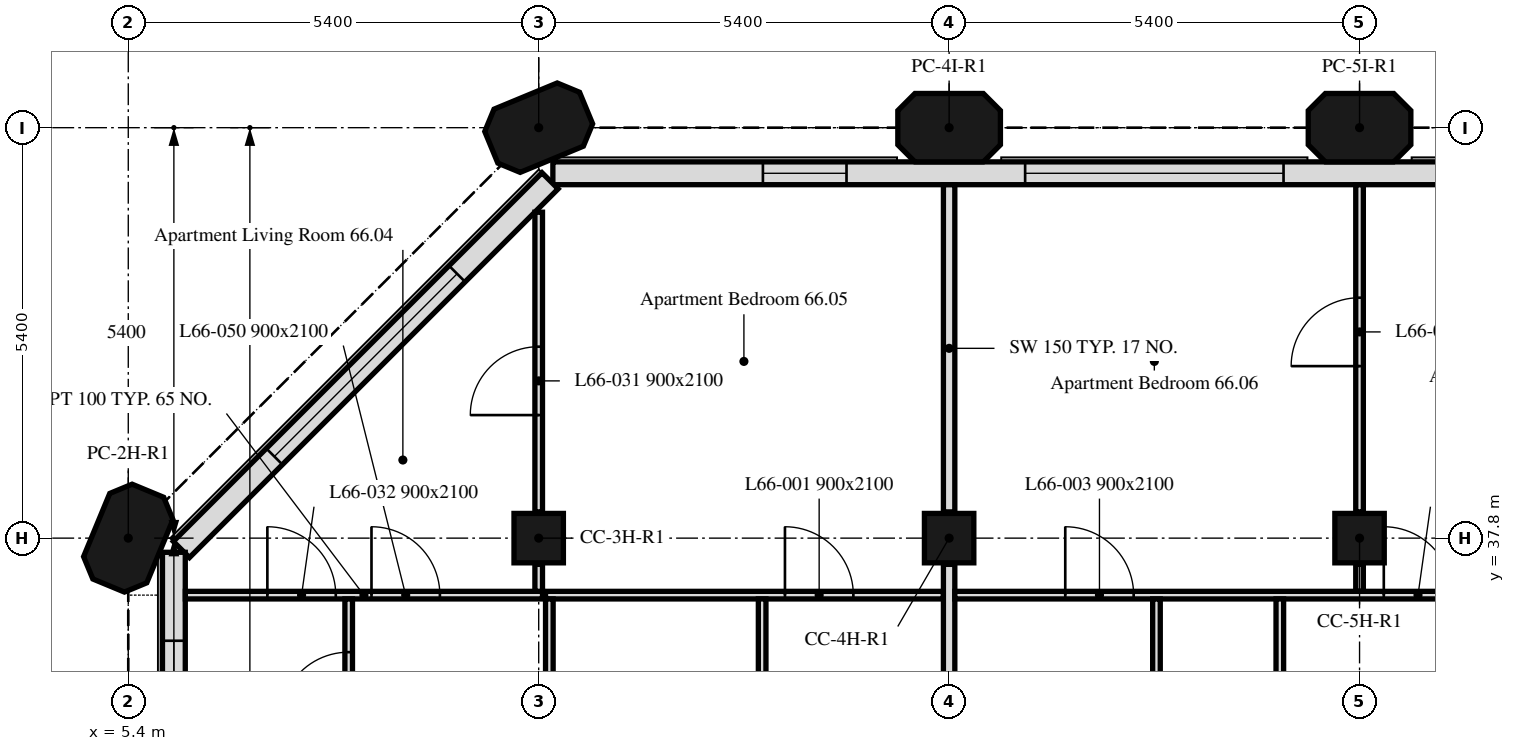
"""IFC4 building model, lengths in metres.
Left out: names, types, materials, properties, quantities, classifications, styles, units other than length and angle.
Written with IfcOpenShell. Run it as: python <this file> out.ifc"""

import sys

from ifc_helpers import new_model, si_unit, direction, frame, frame_2d, origin, origin_2d, place, context, subcontext, project, spatial, polyline, rectangle, outline, extrude, element, fill, save


model = new_model("IFC4")
c1 = context("Model", 3, precision=1e-05, world=origin(), true_north=direction((0.0, 1.0)))
c2 = subcontext(c1, "Body", "Model", "MODEL_VIEW")
j1 = project(units=[si_unit("LENGTHUNIT", "METRE"), si_unit("PLANEANGLEUNIT", "RADIAN")], contexts=[c1])
p1 = place(None, origin())
s1 = spatial("IfcSite", under=j1, at=p1, CompositionType="ELEMENT")
p2 = place(p1, origin())
s2 = spatial("IfcBuilding", under=s1, at=p2, CompositionType="ELEMENT")
p3 = place(p2, frame((0.0, 0.0, 271.9)))
s3 = spatial("IfcBuildingStorey", under=s2, at=p3, CompositionType="ELEMENT", Elevation=271.9)
p4 = place(p3, frame((5.4, 37.8, 0.0), z_axis=(0.0, 0.0, 1.0), x_axis=(0.382683432365, 0.923879532511, 0.0)))
e1 = element("IfcColumn", 1, at=p4, inside=s3, PredefinedType="COLUMN", context=c2, shape_type="SweptSolid", body=[
    extrude(outline(polyline([(-0.45, -0.45), (0.45, -0.45), (0.675, -0.225), (0.675, 0.225), (0.45, 0.45), (-0.45, 0.45), (-0.675, 0.225), (-0.675, -0.225), (-0.45, -0.45)])), origin(), (0.0, 0.0, 1.0), 3.0),
])
for number, where, z_axis, x_axis in (
    (2, (10.8, 37.8, 0.0), (0.0, 0.0, 1.0), (1.0, 0.0, 0.0)),
    (3, (16.2, 37.8, 0.0), (0.0, 0.0, 1.0), (1.0, 0.0, 0.0)),
    (4, (21.6, 37.8, 0.0), (0.0, 0.0, 1.0), (1.0, 0.0, 0.0)),
):
    element("IfcColumn", number, at=place(p3, frame(where, z_axis=z_axis, x_axis=x_axis)), inside=s3, PredefinedType="COLUMN", context=c2, shape_type="SweptSolid", body=[
        extrude(rectangle(XDim=0.65, YDim=0.65, at=origin_2d()), origin(), (0.0, 0.0, 1.0), 3.0),
    ])
for number, where, z_axis, x_axis in (
    (5, (10.8, 43.2, 0.0), (0.0, 0.0, 1.0), (0.924, 0.383, 0.0)),
    (6, (16.2, 43.2, 0.0), (0.0, 0.0, 1.0), (1.0, 0.0, 0.0)),
    (7, (21.6, 43.2, 0.0), (0.0, 0.0, 1.0), (1.0, 0.0, 0.0)),
):
    element("IfcColumn", number, at=place(p3, frame(where, z_axis=z_axis, x_axis=x_axis)), inside=s3, PredefinedType="COLUMN", context=c2, shape_type="SweptSolid", body=[
        extrude(outline(polyline([(-0.45, -0.45), (0.45, -0.45), (0.675, -0.225), (0.675, 0.225), (0.45, 0.45), (-0.45, 0.45), (-0.675, 0.225), (-0.675, -0.225), (-0.45, -0.45)])), origin(), (0.0, 0.0, 1.0), 3.0),
    ])
p5 = place(p3, frame((43.014, 42.6, 0.0), z_axis=(0.0, 0.0, 1.0), x_axis=(-1.0, 0.0, 0.0)))
e8 = element("IfcWall", 8, at=p5, inside=s3, PredefinedType="SOLIDWALL", context=c2, shape_type="SweptSolid", body=[
    extrude(rectangle(XDim=32.027, YDim=0.3, at=frame_2d((16.014, 0.0))), origin(), (0.0, 0.0, 1.0), 3.0),
])
p6 = place(p5, frame((0.814, 0.0, 0.9)))
e9 = element("IfcOpeningElement", 9, at=p6, cuts=e8, PredefinedType="OPENING", context=c2, shape_type="SweptSolid", body=[
    extrude(rectangle(XDim=3.4, YDim=1.7, at=frame_2d((1.7, 0.85))), frame((0.0, 0.16, 0.0), z_axis=(0.0, -1.0, 0.0), x_axis=(1.0, 0.0, 0.0)), (0.0, 0.0, 1.0), 0.32),
])
p7 = place(p5, frame((6.564, 0.0, 0.9)))
e10 = element("IfcOpeningElement", 10, at=p7, cuts=e8, PredefinedType="OPENING", context=c2, shape_type="SweptSolid", body=[
    extrude(rectangle(XDim=1.1, YDim=1.7, at=frame_2d((0.55, 0.85))), frame((0.0, 0.16, 0.0), z_axis=(0.0, -1.0, 0.0), x_axis=(1.0, 0.0, 0.0)), (0.0, 0.0, 1.0), 0.32),
])
p8 = place(p5, frame((11.614, 0.0, 0.9)))
e11 = element("IfcOpeningElement", 11, at=p8, cuts=e8, PredefinedType="OPENING", context=c2, shape_type="SweptSolid", body=[
    extrude(rectangle(XDim=3.4, YDim=1.7, at=frame_2d((1.7, 0.85))), frame((0.0, 0.16, 0.0), z_axis=(0.0, -1.0, 0.0), x_axis=(1.0, 0.0, 0.0)), (0.0, 0.0, 1.0), 0.32),
])
p9 = place(p5, frame((17.364, 0.0, 0.9)))
e12 = element("IfcOpeningElement", 12, at=p9, cuts=e8, PredefinedType="OPENING", context=c2, shape_type="SweptSolid", body=[
    extrude(rectangle(XDim=1.1, YDim=1.7, at=frame_2d((0.55, 0.85))), frame((0.0, 0.16, 0.0), z_axis=(0.0, -1.0, 0.0), x_axis=(1.0, 0.0, 0.0)), (0.0, 0.0, 1.0), 0.32),
])
p10 = place(p5, frame((22.414, 0.0, 0.9)))
e13 = element("IfcOpeningElement", 13, at=p10, cuts=e8, PredefinedType="OPENING", context=c2, shape_type="SweptSolid", body=[
    extrude(rectangle(XDim=3.4, YDim=1.7, at=frame_2d((1.7, 0.85))), frame((0.0, 0.16, 0.0), z_axis=(0.0, -1.0, 0.0), x_axis=(1.0, 0.0, 0.0)), (0.0, 0.0, 1.0), 0.32),
])
p11 = place(p5, frame((28.164, 0.0, 0.9)))
e14 = element("IfcOpeningElement", 14, at=p11, cuts=e8, PredefinedType="OPENING", context=c2, shape_type="SweptSolid", body=[
    extrude(rectangle(XDim=1.1, YDim=1.7, at=frame_2d((0.55, 0.85))), frame((0.0, 0.16, 0.0), z_axis=(0.0, -1.0, 0.0), x_axis=(1.0, 0.0, 0.0)), (0.0, 0.0, 1.0), 0.32),
])
p12 = place(p3, frame((10.949, 42.501, 0.0), z_axis=(0.0, 0.0, 1.0), x_axis=(-0.707106781187, -0.707106781187, 0.0)))
e15 = element("IfcWall", 15, at=p12, inside=s3, PredefinedType="SOLIDWALL", context=c2, shape_type="SweptSolid", body=[
    extrude(rectangle(XDim=6.86, YDim=0.3, at=frame_2d((3.43, 0.0))), origin(), (0.0, 0.0, 1.0), 3.0),
])
p13 = place(p12, frame((1.73, 0.0, 0.9)))
e16 = element("IfcOpeningElement", 16, at=p13, cuts=e15, PredefinedType="OPENING", context=c2, shape_type="SweptSolid", body=[
    extrude(rectangle(XDim=3.4, YDim=1.7, at=frame_2d((1.7, 0.85))), frame((0.0, 0.16, 0.0), z_axis=(0.0, -1.0, 0.0), x_axis=(1.0, 0.0, 0.0)), (0.0, 0.0, 1.0), 0.32),
])
p14 = place(p3, frame((6.0, 37.614, 0.0), z_axis=(0.0, 0.0, 1.0), x_axis=(0.0, -1.0, 0.0)))
e17 = element("IfcWall", 17, at=p14, inside=s3, PredefinedType="SOLIDWALL", context=c2, shape_type="SweptSolid", body=[
    extrude(rectangle(XDim=5.214, YDim=0.3, at=frame_2d((2.607, 0.0))), origin(), (0.0, 0.0, 1.0), 3.0),
])
p15 = place(p14, frame((1.164, 0.0, 0.9)))
e18 = element("IfcOpeningElement", 18, at=p15, cuts=e17, PredefinedType="OPENING", context=c2, shape_type="SweptSolid", body=[
    extrude(rectangle(XDim=1.1, YDim=1.7, at=frame_2d((0.55, 0.85))), frame((0.0, 0.16, 0.0), z_axis=(0.0, -1.0, 0.0), x_axis=(1.0, 0.0, 0.0)), (0.0, 0.0, 1.0), 0.32),
])
p16 = place(p14, frame((3.139, 0.0, 0.9)))
e19 = element("IfcOpeningElement", 19, at=p16, cuts=e17, PredefinedType="OPENING", context=c2, shape_type="SweptSolid", body=[
    extrude(rectangle(XDim=0.65, YDim=1.7, at=frame_2d((0.325, 0.85))), frame((0.0, 0.16, 0.0), z_axis=(0.0, -1.0, 0.0), x_axis=(1.0, 0.0, 0.0)), (0.0, 0.0, 1.0), 0.32),
])
p17 = place(p3, frame((6.151, 37.05, 0.0), z_axis=(0.0, 0.0, 1.0), x_axis=(1.0, 0.0, 0.0)))
e20 = element("IfcWall", 20, at=p17, inside=s3, PredefinedType="PARTITIONING", context=c2, shape_type="SweptSolid", body=[
    extrude(rectangle(XDim=4.699, YDim=0.1, at=frame_2d((2.35, 0.0))), origin(), (0.0, 0.0, 1.0), 3.0),
])
p18 = place(p17, frame((1.079, 0.0, 0.0)))
e21 = element("IfcOpeningElement", 21, at=p18, cuts=e20, PredefinedType="OPENING", context=c2, shape_type="SweptSolid", body=[
    extrude(rectangle(XDim=0.9, YDim=2.1, at=frame_2d((0.45, 1.05))), frame((0.0, 0.05, 0.0), z_axis=(0.0, -1.0, 0.0), x_axis=(1.0, 0.0, 0.0)), (0.0, 0.0, 1.0), 0.1),
])
p19 = place(p17, frame((2.449, 0.0, 0.0)))
e22 = element("IfcOpeningElement", 22, at=p19, cuts=e20, PredefinedType="OPENING", context=c2, shape_type="SweptSolid", body=[
    extrude(rectangle(XDim=0.9, YDim=2.1, at=frame_2d((0.45, 1.05))), frame((0.0, 0.05, 0.0), z_axis=(0.0, -1.0, 0.0), x_axis=(1.0, 0.0, 0.0)), (0.0, 0.0, 1.0), 0.1),
])
p20 = place(p3, frame((10.8, 37.1, 0.0), z_axis=(0.0, 0.0, 1.0), x_axis=(0.0, 1.0, 0.0)))
e23 = element("IfcWall", 23, at=p20, inside=s3, PredefinedType="PARTITIONING", context=c2, shape_type="SweptSolid", body=[
    extrude(rectangle(XDim=0.355, YDim=0.1, at=frame_2d((0.177, 0.0))), origin(), (0.0, 0.0, 1.0), 3.0),
])
p21 = place(p3, frame((10.8, 38.145, 0.0), z_axis=(0.0, 0.0, 1.0), x_axis=(0.0, 1.0, 0.0)))
e24 = element("IfcWall", 24, at=p21, inside=s3, PredefinedType="PARTITIONING", context=c2, shape_type="SweptSolid", body=[
    extrude(rectangle(XDim=3.943, YDim=0.1, at=frame_2d((1.971, 0.0))), origin(), (0.0, 0.0, 1.0), 3.0),
])
p22 = place(p21, frame((1.274, 0.0, 0.0)))
e25 = element("IfcOpeningElement", 25, at=p22, cuts=e24, PredefinedType="OPENING", context=c2, shape_type="SweptSolid", body=[
    extrude(rectangle(XDim=0.9, YDim=2.1, at=frame_2d((0.45, 1.05))), frame((0.0, 0.05, 0.0), z_axis=(0.0, -1.0, 0.0), x_axis=(1.0, 0.0, 0.0)), (0.0, 0.0, 1.0), 0.1),
])
p23 = place(p3, frame((10.89, 37.05, 0.0), z_axis=(0.0, 0.0, 1.0), x_axis=(1.0, 0.0, 0.0)))
e26 = element("IfcWall", 26, at=p23, inside=s3, PredefinedType="PARTITIONING", context=c2, shape_type="SweptSolid", body=[
    extrude(rectangle(XDim=5.235, YDim=0.1, at=frame_2d((2.618, 0.0))), origin(), (0.0, 0.0, 1.0), 3.0),
])
p24 = place(p23, frame((3.15, 0.0, 0.0)))
e27 = element("IfcOpeningElement", 27, at=p24, cuts=e26, PredefinedType="OPENING", context=c2, shape_type="SweptSolid", body=[
    extrude(rectangle(XDim=0.9, YDim=2.1, at=frame_2d((0.45, 1.05))), frame((0.0, 0.05, 0.0), z_axis=(0.0, -1.0, 0.0), x_axis=(1.0, 0.0, 0.0)), (0.0, 0.0, 1.0), 0.1),
])
p25 = place(p3, frame((16.2, 38.145, 0.0), z_axis=(0.0, 0.0, 1.0), x_axis=(0.0, 1.0, 0.0)))
e28 = element("IfcWall", 28, at=p25, inside=s3, PredefinedType="PARTITIONING", context=c2, shape_type="SweptSolid", body=[
    extrude(rectangle(XDim=4.304, YDim=0.15, at=frame_2d((2.152, 0.0))), origin(), (0.0, 0.0, 1.0), 3.0),
])
p26 = place(p3, frame((8.3, 34.725, 0.0), z_axis=(0.0, 0.0, 1.0), x_axis=(0.0, 1.0, 0.0)))
e29 = element("IfcWall", 29, at=p26, inside=s3, PredefinedType="PARTITIONING", context=c2, shape_type="SweptSolid", body=[
    extrude(rectangle(XDim=2.275, YDim=0.1, at=frame_2d((1.137, 0.0))), origin(), (0.0, 0.0, 1.0), 3.0),
])
p27 = place(p26, frame((0.675, 0.0, 0.0)))
e30 = element("IfcOpeningElement", 30, at=p27, cuts=e29, PredefinedType="OPENING", context=c2, shape_type="SweptSolid", body=[
    extrude(rectangle(XDim=0.9, YDim=2.1, at=frame_2d((0.45, 1.05))), frame((0.0, 0.05, 0.0), z_axis=(0.0, -1.0, 0.0), x_axis=(1.0, 0.0, 0.0)), (0.0, 0.0, 1.0), 0.1),
])
p28 = place(p3, frame((10.94, 34.725, 0.0), z_axis=(0.0, 0.0, 1.0), x_axis=(0.0, 1.0, 0.0)))
e31 = element("IfcWall", 31, at=p28, inside=s3, PredefinedType="PARTITIONING", context=c2, shape_type="SweptSolid", body=[
    extrude(rectangle(XDim=2.275, YDim=0.1, at=frame_2d((1.137, 0.0))), origin(), (0.0, 0.0, 1.0), 3.0),
])
p29 = place(p28, frame((0.25, 0.0, 0.0)))
e32 = element("IfcOpeningElement", 32, at=p29, cuts=e31, PredefinedType="OPENING", context=c2, shape_type="SweptSolid", body=[
    extrude(rectangle(XDim=0.9, YDim=2.1, at=frame_2d((0.45, 1.05))), frame((0.0, 0.05, 0.0), z_axis=(0.0, -1.0, 0.0), x_axis=(1.0, 0.0, 0.0)), (0.0, 0.0, 1.0), 0.1),
])
p30 = place(p3, frame((13.74, 34.725, 0.0), z_axis=(0.0, 0.0, 1.0), x_axis=(0.0, 1.0, 0.0)))
e33 = element("IfcWall", 33, at=p30, inside=s3, PredefinedType="PARTITIONING", context=c2, shape_type="SweptSolid", body=[
    extrude(rectangle(XDim=2.275, YDim=0.1, at=frame_2d((1.137, 0.0))), origin(), (0.0, 0.0, 1.0), 3.0),
])
p31 = place(p3, frame((16.2, 34.725, 0.0), z_axis=(0.0, 0.0, 1.0), x_axis=(0.0, 1.0, 0.0)))
e34 = element("IfcWall", 34, at=p31, inside=s3, PredefinedType="PARTITIONING", context=c2, shape_type="SweptSolid", body=[
    extrude(rectangle(XDim=2.73, YDim=0.15, at=frame_2d((1.365, 0.0))), origin(), (0.0, 0.0, 1.0), 3.0),
])
p32 = place(p3, frame((21.6, 37.1, 0.0), z_axis=(0.0, 0.0, 1.0), x_axis=(0.0, 1.0, 0.0)))
e35 = element("IfcWall", 35, at=p32, inside=s3, PredefinedType="PARTITIONING", context=c2, shape_type="SweptSolid", body=[
    extrude(rectangle(XDim=0.355, YDim=0.1, at=frame_2d((0.177, 0.0))), origin(), (0.0, 0.0, 1.0), 3.0),
])
p33 = place(p3, frame((21.6, 38.145, 0.0), z_axis=(0.0, 0.0, 1.0), x_axis=(0.0, 1.0, 0.0)))
e36 = element("IfcWall", 36, at=p33, inside=s3, PredefinedType="PARTITIONING", context=c2, shape_type="SweptSolid", body=[
    extrude(rectangle(XDim=4.304, YDim=0.1, at=frame_2d((2.152, 0.0))), origin(), (0.0, 0.0, 1.0), 3.0),
])
p34 = place(p33, frame((1.918, 0.0, 0.0)))
e37 = element("IfcOpeningElement", 37, at=p34, cuts=e36, PredefinedType="OPENING", context=c2, shape_type="SweptSolid", body=[
    extrude(rectangle(XDim=0.9, YDim=2.1, at=frame_2d((0.45, 1.05))), frame((0.0, 0.05, 0.0), z_axis=(0.0, -1.0, 0.0), x_axis=(1.0, 0.0, 0.0)), (0.0, 0.0, 1.0), 0.1),
])
p35 = place(p3, frame((16.275, 37.05, 0.0), z_axis=(0.0, 0.0, 1.0), x_axis=(1.0, 0.0, 0.0)))
e38 = element("IfcWall", 38, at=p35, inside=s3, PredefinedType="PARTITIONING", context=c2, shape_type="SweptSolid", body=[
    extrude(rectangle(XDim=16.05, YDim=0.1, at=frame_2d((8.025, 0.0))), origin(), (0.0, 0.0, 1.0), 3.0),
])
p36 = place(p35, frame((1.453, 0.0, 0.0)))
e39 = element("IfcOpeningElement", 39, at=p36, cuts=e38, PredefinedType="OPENING", context=c2, shape_type="SweptSolid", body=[
    extrude(rectangle(XDim=0.9, YDim=2.1, at=frame_2d((0.45, 1.05))), frame((0.0, 0.05, 0.0), z_axis=(0.0, -1.0, 0.0), x_axis=(1.0, 0.0, 0.0)), (0.0, 0.0, 1.0), 0.1),
])
p37 = place(p35, frame((12.125, 0.0, 0.0)))
e40 = element("IfcOpeningElement", 40, at=p37, cuts=e38, PredefinedType="OPENING", context=c2, shape_type="SweptSolid", body=[
    extrude(rectangle(XDim=0.9, YDim=2.1, at=frame_2d((0.45, 1.05))), frame((0.0, 0.05, 0.0), z_axis=(0.0, -1.0, 0.0), x_axis=(1.0, 0.0, 0.0)), (0.0, 0.0, 1.0), 0.1),
])
p38 = place(p35, frame((13.625, 0.0, 0.0)))
e41 = element("IfcOpeningElement", 41, at=p38, cuts=e38, PredefinedType="OPENING", context=c2, shape_type="SweptSolid", body=[
    extrude(rectangle(XDim=0.9, YDim=2.1, at=frame_2d((0.45, 1.05))), frame((0.0, 0.05, 0.0), z_axis=(0.0, -1.0, 0.0), x_axis=(1.0, 0.0, 0.0)), (0.0, 0.0, 1.0), 0.1),
])
p39 = place(p35, frame((5.644, 0.0, 0.0)))
e42 = element("IfcOpeningElement", 42, at=p39, cuts=e38, PredefinedType="OPENING", context=c2, shape_type="SweptSolid", body=[
    extrude(rectangle(XDim=0.9, YDim=2.1, at=frame_2d((0.45, 1.05))), frame((0.0, 0.05, 0.0), z_axis=(0.0, -1.0, 0.0), x_axis=(1.0, 0.0, 0.0)), (0.0, 0.0, 1.0), 0.1),
])
p40 = place(p3, frame((18.928, 34.725, 0.0), z_axis=(0.0, 0.0, 1.0), x_axis=(0.0, 1.0, 0.0)))
e43 = element("IfcWall", 43, at=p40, inside=s3, PredefinedType="PARTITIONING", context=c2, shape_type="SweptSolid", body=[
    extrude(rectangle(XDim=2.275, YDim=0.1, at=frame_2d((1.137, 0.0))), origin(), (0.0, 0.0, 1.0), 3.0),
])
p41 = place(p3, frame((20.551, 34.725, 0.0), z_axis=(0.0, 0.0, 1.0), x_axis=(0.0, 1.0, 0.0)))
e44 = element("IfcWall", 44, at=p41, inside=s3, PredefinedType="PARTITIONING", context=c2, shape_type="SweptSolid", body=[
    extrude(rectangle(XDim=2.275, YDim=0.1, at=frame_2d((1.137, 0.0))), origin(), (0.0, 0.0, 1.0), 3.0),
])
p42 = place(p41, frame((0.25, 0.0, 0.0)))
e45 = element("IfcOpeningElement", 45, at=p42, cuts=e44, PredefinedType="OPENING", context=c2, shape_type="SweptSolid", body=[
    extrude(rectangle(XDim=0.9, YDim=2.1, at=frame_2d((0.45, 1.05))), frame((0.0, 0.05, 0.0), z_axis=(0.0, -1.0, 0.0), x_axis=(1.0, 0.0, 0.0)), (0.0, 0.0, 1.0), 0.1),
])
p43 = place(p10, origin())
e46 = element("IfcWindow", 46, at=p43, inside=s3, PartitioningType="SINGLE_PANEL", PredefinedType="WINDOW", context=c2, shape_type="SweptSolid", body=[
    extrude(rectangle(XDim=3.4, YDim=1.7, at=frame_2d((1.7, 0.85))), frame((0.0, 0.03, 0.0), z_axis=(0.0, -1.0, 0.0), x_axis=(1.0, 0.0, 0.0)), (0.0, 0.0, 1.0), 0.06),
])
fill(e13, e46)
p44 = place(p11, origin())
e47 = element("IfcWindow", 47, at=p44, inside=s3, PartitioningType="SINGLE_PANEL", PredefinedType="WINDOW", context=c2, shape_type="SweptSolid", body=[
    extrude(rectangle(XDim=1.1, YDim=1.7, at=frame_2d((0.55, 0.85))), frame((0.0, 0.03, 0.0), z_axis=(0.0, -1.0, 0.0), x_axis=(1.0, 0.0, 0.0)), (0.0, 0.0, 1.0), 0.06),
])
fill(e14, e47)
p45 = place(p13, origin())
e48 = element("IfcWindow", 48, at=p45, inside=s3, PartitioningType="SINGLE_PANEL", PredefinedType="WINDOW", context=c2, shape_type="SweptSolid", body=[
    extrude(rectangle(XDim=3.4, YDim=1.7, at=frame_2d((1.7, 0.85))), frame((0.0, 0.03, 0.0), z_axis=(0.0, -1.0, 0.0), x_axis=(1.0, 0.0, 0.0)), (0.0, 0.0, 1.0), 0.06),
])
fill(e16, e48)
p46 = place(p15, origin())
e49 = element("IfcWindow", 49, at=p46, inside=s3, PartitioningType="SINGLE_PANEL", PredefinedType="WINDOW", context=c2, shape_type="SweptSolid", body=[
    extrude(rectangle(XDim=1.1, YDim=1.7, at=frame_2d((0.55, 0.85))), frame((0.0, 0.03, 0.0), z_axis=(0.0, -1.0, 0.0), x_axis=(1.0, 0.0, 0.0)), (0.0, 0.0, 1.0), 0.06),
])
fill(e18, e49)
p47 = place(p24, origin())
e50 = element("IfcDoor", 50, at=p47, inside=s3, OperationType="SINGLE_SWING_LEFT", PredefinedType="DOOR", context=c2, shape_type="SweptSolid", body=[
    extrude(rectangle(XDim=0.9, YDim=2.1, at=frame_2d((0.45, 1.05))), frame((0.0, 0.025, 0.0), z_axis=(0.0, -1.0, 0.0), x_axis=(1.0, 0.0, 0.0)), (0.0, 0.0, 1.0), 0.05),
])
fill(e27, e50)
p48 = place(p36, origin())
e51 = element("IfcDoor", 51, at=p48, inside=s3, OperationType="SINGLE_SWING_RIGHT", PredefinedType="DOOR", context=c2, shape_type="SweptSolid", body=[
    extrude(rectangle(XDim=0.9, YDim=2.1, at=frame_2d((0.45, 1.05))), frame((0.0, 0.025, 0.0), z_axis=(0.0, -1.0, 0.0), x_axis=(1.0, 0.0, 0.0)), (0.0, 0.0, 1.0), 0.05),
])
fill(e39, e51)
p49 = place(p22, origin())
e52 = element("IfcDoor", 52, at=p49, inside=s3, OperationType="SINGLE_SWING_LEFT", PredefinedType="DOOR", context=c2, shape_type="SweptSolid", body=[
    extrude(rectangle(XDim=0.9, YDim=2.1, at=frame_2d((0.45, 1.05))), frame((0.0, 0.025, 0.0), z_axis=(0.0, -1.0, 0.0), x_axis=(1.0, 0.0, 0.0)), (0.0, 0.0, 1.0), 0.05),
])
fill(e25, e52)
p50 = place(p18, origin())
e53 = element("IfcDoor", 53, at=p50, inside=s3, OperationType="SINGLE_SWING_RIGHT", PredefinedType="DOOR", context=c2, shape_type="SweptSolid", body=[
    extrude(rectangle(XDim=0.9, YDim=2.1, at=frame_2d((0.45, 1.05))), frame((0.0, 0.025, 0.0), z_axis=(0.0, -1.0, 0.0), x_axis=(1.0, 0.0, 0.0)), (0.0, 0.0, 1.0), 0.05),
])
fill(e21, e53)
p51 = place(p27, origin())
e54 = element("IfcDoor", 54, at=p51, inside=s3, OperationType="SINGLE_SWING_LEFT", PredefinedType="DOOR", context=c2, shape_type="SweptSolid", body=[
    extrude(rectangle(XDim=0.9, YDim=2.1, at=frame_2d((0.45, 1.05))), frame((0.0, 0.025, 0.0), z_axis=(0.0, -1.0, 0.0), x_axis=(1.0, 0.0, 0.0)), (0.0, 0.0, 1.0), 0.05),
])
fill(e30, e54)
p52 = place(p34, origin())
e55 = element("IfcDoor", 55, at=p52, inside=s3, OperationType="SINGLE_SWING_LEFT", PredefinedType="DOOR", context=c2, shape_type="SweptSolid", body=[
    extrude(rectangle(XDim=0.9, YDim=2.1, at=frame_2d((0.45, 1.05))), frame((0.0, 0.025, 0.0), z_axis=(0.0, -1.0, 0.0), x_axis=(1.0, 0.0, 0.0)), (0.0, 0.0, 1.0), 0.05),
])
fill(e37, e55)
p53 = place(p19, origin())
e56 = element("IfcDoor", 56, at=p53, inside=s3, OperationType="SINGLE_SWING_LEFT", PredefinedType="DOOR", context=c2, shape_type="SweptSolid", body=[
    extrude(rectangle(XDim=0.9, YDim=2.1, at=frame_2d((0.45, 1.05))), frame((0.0, 0.025, 0.0), z_axis=(0.0, -1.0, 0.0), x_axis=(1.0, 0.0, 0.0)), (0.0, 0.0, 1.0), 0.05),
])
fill(e22, e56)
p54 = place(p39, origin())
e57 = element("IfcDoor", 57, at=p54, inside=s3, OperationType="SINGLE_SWING_RIGHT", PredefinedType="DOOR", context=c2, shape_type="SweptSolid", body=[
    extrude(rectangle(XDim=0.9, YDim=2.1, at=frame_2d((0.45, 1.05))), frame((0.0, 0.025, 0.0), z_axis=(0.0, -1.0, 0.0), x_axis=(1.0, 0.0, 0.0)), (0.0, 0.0, 1.0), 0.05),
])
fill(e42, e57)
save(model, sys.argv[1])
